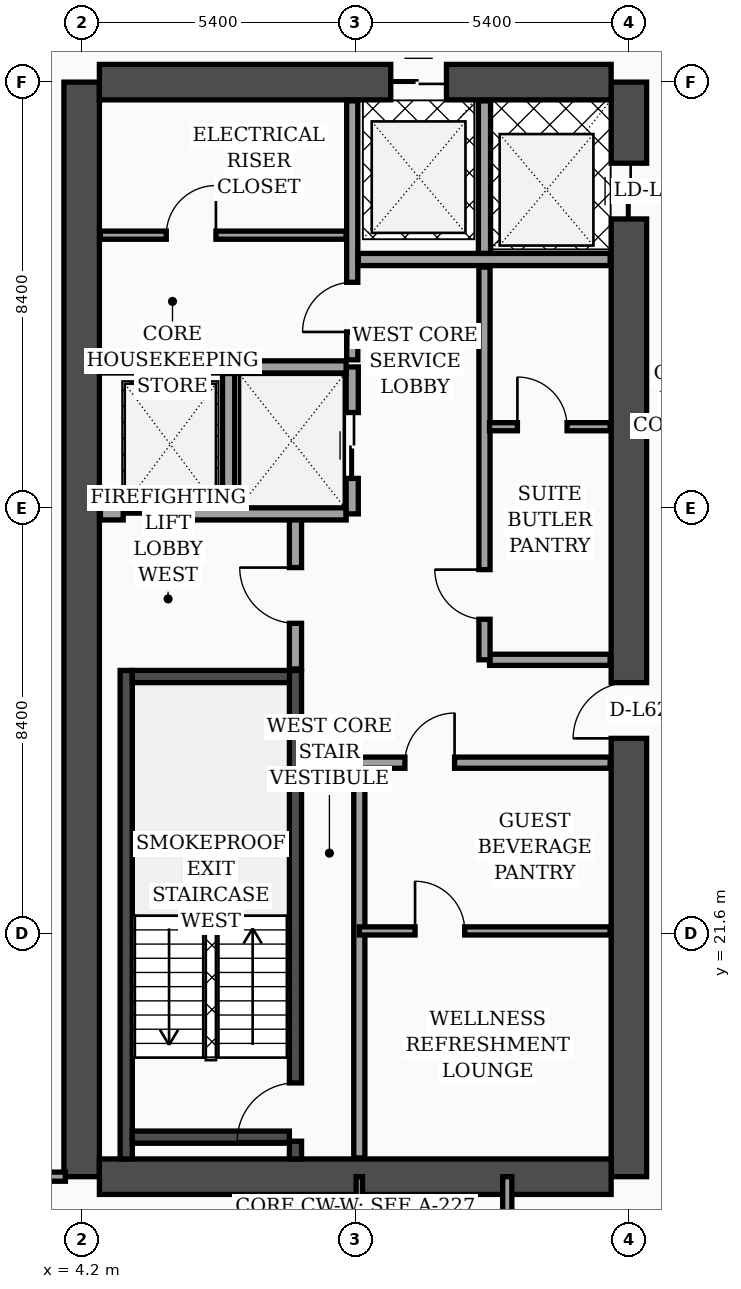
"""IFC4 building model, lengths in metres.
Left out: names, types, materials, properties, quantities, classifications, styles, units other than length and angle.
Written with IfcOpenShell. Run it as: python <this file> out.ifc"""

import sys

from ifc_helpers import new_model, si_unit, direction, frame, frame_2d, origin, place, context, subcontext, project, spatial, rectangle, extrude, element, fill, save


model = new_model("IFC4")
c1 = context("Model", 3, precision=1e-05, world=origin(), true_north=direction((0.0, 1.0)))
c2 = subcontext(c1, "Body", "Model", "MODEL_VIEW")
j1 = project(units=[si_unit("LENGTHUNIT", "METRE"), si_unit("PLANEANGLEUNIT", "RADIAN")], contexts=[c1])
p1 = place(None, origin())
s1 = spatial("IfcSite", under=j1, at=p1, CompositionType="ELEMENT")
p2 = place(p1, origin())
s2 = spatial("IfcBuilding", under=s1, at=p2, CompositionType="ELEMENT")
p3 = place(p2, frame((0.0, 0.0, 251.4)))
s3 = spatial("IfcBuildingStorey", under=s2, at=p3, CompositionType="ELEMENT", Elevation=251.4)
p4 = place(p3, frame((4.2, 16.8, 0.0), z_axis=(0.0, 0.0, 1.0), x_axis=(0.0, 1.0, 0.0)))
e1 = element("IfcWall", 1, at=p4, inside=s3, PredefinedType="SHEAR", context=c2, shape_type="SweptSolid", body=[
    extrude(rectangle(XDim=21.6, YDim=0.7, at=frame_2d((10.8, 0.0))), origin(), (0.0, 0.0, 1.0), 3.56),
])
p5 = place(p3, frame((15.0, 16.8, 0.0), z_axis=(0.0, 0.0, 1.0), x_axis=(0.0, 1.0, 0.0)))
e2 = element("IfcWall", 2, at=p5, inside=s3, PredefinedType="SHEAR", context=c2, shape_type="SweptSolid", body=[
    extrude(rectangle(XDim=21.6, YDim=0.7, at=frame_2d((10.8, 0.0))), origin(), (0.0, 0.0, 1.0), 3.56),
])
p6 = place(p5, frame((8.65, 0.0, 0.0)))
e3 = element("IfcOpeningElement", 3, at=p6, cuts=e2, PredefinedType="OPENING", context=c2, shape_type="SweptSolid", body=[
    extrude(rectangle(XDim=1.1, YDim=2.2, at=frame_2d((0.55, 1.1))), frame((0.0, 0.36, 0.0), z_axis=(0.0, -1.0, 0.0), x_axis=(1.0, 0.0, 0.0)), (0.0, 0.0, 1.0), 0.72),
])
p7 = place(p5, frame((18.9, 0.0, 0.0)))
e4 = element("IfcOpeningElement", 4, at=p7, cuts=e2, PredefinedType="OPENING", context=c2, shape_type="SweptSolid", body=[
    extrude(rectangle(XDim=1.1, YDim=2.2, at=frame_2d((0.55, 1.1))), frame((0.0, 0.36, 0.0), z_axis=(0.0, -1.0, 0.0), x_axis=(1.0, 0.0, 0.0)), (0.0, 0.0, 1.0), 0.72),
])
p8 = place(p3, frame((4.55, 38.4, 0.0), z_axis=(0.0, 0.0, 1.0), x_axis=(1.0, 0.0, 0.0)))
e5 = element("IfcWall", 5, at=p8, inside=s3, PredefinedType="SHEAR", context=c2, shape_type="SweptSolid", body=[
    extrude(rectangle(XDim=10.1, YDim=0.7, at=frame_2d((5.05, 0.0))), origin(), (0.0, 0.0, 1.0), 3.56),
])
p9 = place(p8, frame((5.75, 0.0, 0.0)))
e6 = element("IfcOpeningElement", 6, at=p9, cuts=e5, PredefinedType="OPENING", context=c2, shape_type="SweptSolid", body=[
    extrude(rectangle(XDim=1.1, YDim=2.2, at=frame_2d((0.55, 1.1))), frame((0.0, 0.36, 0.0), z_axis=(0.0, -1.0, 0.0), x_axis=(1.0, 0.0, 0.0)), (0.0, 0.0, 1.0), 0.72),
])
p10 = place(p3, frame((4.55, 16.8, 0.0), z_axis=(0.0, 0.0, 1.0), x_axis=(1.0, 0.0, 0.0)))
e7 = element("IfcWall", 7, at=p10, inside=s3, PredefinedType="SHEAR", context=c2, shape_type="SweptSolid", body=[
    extrude(rectangle(XDim=10.1, YDim=0.7, at=frame_2d((5.05, 0.0))), origin(), (0.0, 0.0, 1.0), 3.56),
])
p11 = place(p3, frame((5.08, 17.15, 0.0), z_axis=(0.0, 0.0, 1.0), x_axis=(0.0, 1.0, 0.0)))
e8 = element("IfcWall", 8, at=p11, inside=s3, PredefinedType="SOLIDWALL", context=c2, shape_type="SweptSolid", body=[
    extrude(rectangle(XDim=9.64, YDim=0.24, at=frame_2d((4.82, 0.0))), origin(), (0.0, 0.0, 1.0), 3.56),
])
p12 = place(p3, frame((8.42, 17.15, 0.0), z_axis=(0.0, 0.0, 1.0), x_axis=(0.0, 1.0, 0.0)))
e9 = element("IfcWall", 9, at=p12, inside=s3, PredefinedType="SOLIDWALL", context=c2, shape_type="SweptSolid", body=[
    extrude(rectangle(XDim=9.64, YDim=0.24, at=frame_2d((4.82, 0.0))), origin(), (0.0, 0.0, 1.0), 3.56),
])
p13 = place(p12, frame((0.35, 0.0, 0.0)))
e10 = element("IfcOpeningElement", 10, at=p13, cuts=e9, PredefinedType="OPENING", context=c2, shape_type="SweptSolid", body=[
    extrude(rectangle(XDim=1.15, YDim=2.2, at=frame_2d((0.575, 1.1))), frame((0.0, 0.13, 0.0), z_axis=(0.0, -1.0, 0.0), x_axis=(1.0, 0.0, 0.0)), (0.0, 0.0, 1.0), 0.26),
])
for number, where, z_axis, x_axis in (
    (11, (5.2, 17.58, 0.0), (0.0, 0.0, 1.0), (1.0, 0.0, 0.0)),
    (12, (5.2, 26.67, 0.0), (0.0, 0.0, 1.0), (1.0, 0.0, 0.0)),
):
    element("IfcWall", number, at=place(p3, frame(where, z_axis=z_axis, x_axis=x_axis)), inside=s3, PredefinedType="SOLIDWALL", context=c2, shape_type="SweptSolid", body=[
        extrude(rectangle(XDim=3.1, YDim=0.24, at=frame_2d((1.55, 0.0))), origin(), (0.0, 0.0, 1.0), 3.56),
    ])
p14 = place(p3, frame((8.42, 26.82, 0.0), z_axis=(0.0, 0.0, 1.0), x_axis=(0.0, 1.0, 0.0)))
e13 = element("IfcWall", 13, at=p14, inside=s3, PredefinedType="SOLIDWALL", context=c2, shape_type="SweptSolid", body=[
    extrude(rectangle(XDim=3.0, YDim=0.24, at=frame_2d((1.5, 0.0))), origin(), (0.0, 0.0, 1.0), 3.56),
])
p15 = place(p14, frame((0.9, 0.0, 0.0)))
e14 = element("IfcOpeningElement", 14, at=p15, cuts=e13, PredefinedType="OPENING", context=c2, shape_type="SweptSolid", body=[
    extrude(rectangle(XDim=1.1, YDim=2.2, at=frame_2d((0.55, 1.1))), frame((0.0, 0.13, 0.0), z_axis=(0.0, -1.0, 0.0), x_axis=(1.0, 0.0, 0.0)), (0.0, 0.0, 1.0), 0.26),
])
p16 = place(p3, frame((4.57, 29.88, 0.0), z_axis=(0.0, 0.0, 1.0), x_axis=(1.0, 0.0, 0.0)))
e15 = element("IfcWall", 15, at=p16, inside=s3, PredefinedType="SOLIDWALL", context=c2, shape_type="SweptSolid", body=[
    extrude(rectangle(XDim=4.85, YDim=0.24, at=frame_2d((2.425, 0.0))), origin(), (0.0, 0.0, 1.0), 3.56),
])
p17 = place(p16, frame((0.45, 0.0, 0.0)))
e16 = element("IfcOpeningElement", 16, at=p17, cuts=e15, PredefinedType="OPENING", context=c2, shape_type="SweptSolid", body=[
    extrude(rectangle(XDim=1.3, YDim=2.35, at=frame_2d((0.65, 1.175))), frame((0.0, 0.13, 0.0), z_axis=(0.0, -1.0, 0.0), x_axis=(1.0, 0.0, 0.0)), (0.0, 0.0, 1.0), 0.26),
])
p18 = place(p3, frame((7.1, 30.02, 0.0), z_axis=(0.0, 0.0, 1.0), x_axis=(0.0, 1.0, 0.0)))
e17 = element("IfcWall", 17, at=p18, inside=s3, PredefinedType="SOLIDWALL", context=c2, shape_type="SweptSolid", body=[
    extrude(rectangle(XDim=2.63, YDim=0.24, at=frame_2d((1.315, 0.0))), origin(), (0.0, 0.0, 1.0), 3.56),
])
p19 = place(p3, frame((9.54, 29.88, 0.0), z_axis=(0.0, 0.0, 1.0), x_axis=(0.0, 1.0, 0.0)))
e18 = element("IfcWall", 18, at=p19, inside=s3, PredefinedType="SOLIDWALL", context=c2, shape_type="SweptSolid", body=[
    extrude(rectangle(XDim=2.9, YDim=0.24, at=frame_2d((1.45, 0.0))), origin(), (0.0, 0.0, 1.0), 3.56),
])
p20 = place(p19, frame((0.7, 0.0, 0.0)))
e19 = element("IfcOpeningElement", 19, at=p20, cuts=e18, PredefinedType="OPENING", context=c2, shape_type="SweptSolid", body=[
    extrude(rectangle(XDim=1.3, YDim=2.35, at=frame_2d((0.65, 1.175))), frame((0.0, 0.13, 0.0), z_axis=(0.0, -1.0, 0.0), x_axis=(1.0, 0.0, 0.0)), (0.0, 0.0, 1.0), 0.26),
])
p21 = place(p3, frame((4.57, 32.78, 0.0), z_axis=(0.0, 0.0, 1.0), x_axis=(1.0, 0.0, 0.0)))
e20 = element("IfcWall", 20, at=p21, inside=s3, PredefinedType="SOLIDWALL", context=c2, shape_type="SweptSolid", body=[
    extrude(rectangle(XDim=4.85, YDim=0.24, at=frame_2d((2.425, 0.0))), origin(), (0.0, 0.0, 1.0), 3.19),
])
p22 = place(p3, frame((9.68, 17.17, 0.0), z_axis=(0.0, 0.0, 1.0), x_axis=(0.0, 1.0, 0.0)))
e21 = element("IfcWall", 21, at=p22, inside=s3, PredefinedType="SOLIDWALL", context=c2, shape_type="SweptSolid", body=[
    extrude(rectangle(XDim=7.83, YDim=0.22, at=frame_2d((3.915, 0.0))), origin(), (0.0, 0.0, 1.0), 3.56),
])
p23 = place(p3, frame((4.57, 35.38, 0.0), z_axis=(0.0, 0.0, 1.0), x_axis=(1.0, 0.0, 0.0)))
e22 = element("IfcWall", 22, at=p23, inside=s3, PredefinedType="PARTITIONING", context=c2, shape_type="SweptSolid", body=[
    extrude(rectangle(XDim=4.85, YDim=0.16, at=frame_2d((2.425, 0.0))), origin(), (0.0, 0.0, 1.0), 3.56),
])
p24 = place(p23, frame((1.3, 0.0, 0.0)))
e23 = element("IfcOpeningElement", 23, at=p24, cuts=e22, PredefinedType="OPENING", context=c2, shape_type="SweptSolid", body=[
    extrude(rectangle(XDim=0.98, YDim=2.15, at=frame_2d((0.49, 1.075))), frame((0.0, 0.09, 0.0), z_axis=(0.0, -1.0, 0.0), x_axis=(1.0, 0.0, 0.0)), (0.0, 0.0, 1.0), 0.18),
])
p25 = place(p3, frame((9.54, 32.92, 0.0), z_axis=(0.0, 0.0, 1.0), x_axis=(0.0, 1.0, 0.0)))
e24 = element("IfcWall", 24, at=p25, inside=s3, PredefinedType="SOLIDWALL", context=c2, shape_type="SweptSolid", body=[
    extrude(rectangle(XDim=5.11, YDim=0.22, at=frame_2d((2.555, 0.0))), origin(), (0.0, 0.0, 1.0), 3.56),
])
p26 = place(p25, frame((0.55, 0.0, 0.0)))
e25 = element("IfcOpeningElement", 25, at=p26, cuts=e24, PredefinedType="OPENING", context=c2, shape_type="SweptSolid", body=[
    extrude(rectangle(XDim=0.98, YDim=2.15, at=frame_2d((0.49, 1.075))), frame((0.0, 0.12, 0.0), z_axis=(0.0, -1.0, 0.0), x_axis=(1.0, 0.0, 0.0)), (0.0, 0.0, 1.0), 0.24),
])
p27 = place(p3, frame((9.68, 21.65, 0.0), z_axis=(0.0, 0.0, 1.0), x_axis=(1.0, 0.0, 0.0)))
e26 = element("IfcWall", 26, at=p27, inside=s3, PredefinedType="PARTITIONING", context=c2, shape_type="SweptSolid", body=[
    extrude(rectangle(XDim=4.95, YDim=0.16, at=frame_2d((2.475, 0.0))), origin(), (0.0, 0.0, 1.0), 3.09),
])
p28 = place(p27, frame((1.1, 0.0, 0.0)))
e27 = element("IfcOpeningElement", 27, at=p28, cuts=e26, PredefinedType="OPENING", context=c2, shape_type="SweptSolid", body=[
    extrude(rectangle(XDim=0.98, YDim=2.15, at=frame_2d((0.49, 1.075))), frame((0.0, 0.09, 0.0), z_axis=(0.0, -1.0, 0.0), x_axis=(1.0, 0.0, 0.0)), (0.0, 0.0, 1.0), 0.18),
])
p29 = place(p3, frame((9.68, 24.97, 0.0), z_axis=(0.0, 0.0, 1.0), x_axis=(1.0, 0.0, 0.0)))
e28 = element("IfcWall", 28, at=p29, inside=s3, PredefinedType="SOLIDWALL", context=c2, shape_type="SweptSolid", body=[
    extrude(rectangle(XDim=4.95, YDim=0.22, at=frame_2d((2.475, 0.0))), origin(), (0.0, 0.0, 1.0), 2.99),
])
p30 = place(p29, frame((0.9, 0.0, 0.0)))
e29 = element("IfcOpeningElement", 29, at=p30, cuts=e28, PredefinedType="OPENING", context=c2, shape_type="SweptSolid", body=[
    extrude(rectangle(XDim=0.98, YDim=2.15, at=frame_2d((0.49, 1.075))), frame((0.0, 0.12, 0.0), z_axis=(0.0, -1.0, 0.0), x_axis=(1.0, 0.0, 0.0)), (0.0, 0.0, 1.0), 0.24),
])
p31 = place(p3, frame((12.25, 27.0, 0.0), z_axis=(0.0, 0.0, 1.0), x_axis=(1.0, 0.0, 0.0)))
e30 = element("IfcWall", 30, at=p31, inside=s3, PredefinedType="SOLIDWALL", context=c2, shape_type="SweptSolid", body=[
    extrude(rectangle(XDim=2.38, YDim=0.22, at=frame_2d((1.19, 0.0))), origin(), (0.0, 0.0, 1.0), 3.56),
])
p32 = place(p3, frame((12.15, 27.0, 0.0), z_axis=(0.0, 0.0, 1.0), x_axis=(0.0, 1.0, 0.0)))
e31 = element("IfcWall", 31, at=p32, inside=s3, PredefinedType="SOLIDWALL", context=c2, shape_type="SweptSolid", body=[
    extrude(rectangle(XDim=7.75, YDim=0.22, at=frame_2d((3.875, 0.0))), origin(), (0.0, 0.0, 1.0), 3.56),
])
p33 = place(p32, frame((0.8, 0.0, 0.0)))
e32 = element("IfcOpeningElement", 32, at=p33, cuts=e31, PredefinedType="OPENING", context=c2, shape_type="SweptSolid", body=[
    extrude(rectangle(XDim=0.98, YDim=2.15, at=frame_2d((0.49, 1.075))), frame((0.0, 0.12, 0.0), z_axis=(0.0, -1.0, 0.0), x_axis=(1.0, 0.0, 0.0)), (0.0, 0.0, 1.0), 0.24),
])
p34 = place(p3, frame((12.25, 31.6, 0.0), z_axis=(0.0, 0.0, 1.0), x_axis=(1.0, 0.0, 0.0)))
e33 = element("IfcWall", 33, at=p34, inside=s3, PredefinedType="PARTITIONING", context=c2, shape_type="SweptSolid", body=[
    extrude(rectangle(XDim=2.38, YDim=0.16, at=frame_2d((1.19, 0.0))), origin(), (0.0, 0.0, 1.0), 3.14),
])
p35 = place(p34, frame((0.55, 0.0, 0.0)))
e34 = element("IfcOpeningElement", 34, at=p35, cuts=e33, PredefinedType="OPENING", context=c2, shape_type="SweptSolid", body=[
    extrude(rectangle(XDim=0.98, YDim=2.15, at=frame_2d((0.49, 1.075))), frame((0.0, 0.09, 0.0), z_axis=(0.0, -1.0, 0.0), x_axis=(1.0, 0.0, 0.0)), (0.0, 0.0, 1.0), 0.18),
])
p36 = place(p3, frame((9.66, 34.9, 0.0), z_axis=(0.0, 0.0, 1.0), x_axis=(1.0, 0.0, 0.0)))
e35 = element("IfcWall", 35, at=p36, inside=s3, PredefinedType="SOLIDWALL", context=c2, shape_type="SweptSolid", body=[
    extrude(rectangle(XDim=4.97, YDim=0.24, at=frame_2d((2.485, 0.0))), origin(), (0.0, 0.0, 1.0), 3.56),
])
p37 = place(p3, frame((12.15, 35.02, 0.0), z_axis=(0.0, 0.0, 1.0), x_axis=(0.0, 1.0, 0.0)))
e36 = element("IfcWall", 36, at=p37, inside=s3, PredefinedType="SOLIDWALL", context=c2, shape_type="SweptSolid", body=[
    extrude(rectangle(XDim=3.01, YDim=0.24, at=frame_2d((1.505, 0.0))), origin(), (0.0, 0.0, 1.0), 3.56),
])
p38 = place(p3, frame((0.08, 16.8, 0.0), z_axis=(0.0, 0.0, 1.0), x_axis=(1.0, 0.0, 0.0)))
e37 = element("IfcWall", 37, at=p38, inside=s3, PredefinedType="PARTITIONING", context=c2, shape_type="SweptSolid", body=[
    extrude(rectangle(XDim=3.8, YDim=0.18, at=frame_2d((1.9, 0.0))), origin(), (0.0, 0.0, 1.0), 2.99),
])
p39 = place(p3, frame((9.68, 14.75, 0.0), z_axis=(0.0, 0.0, 1.0), x_axis=(0.0, 1.0, 0.0)))
e38 = element("IfcWall", 38, at=p39, inside=s3, PredefinedType="PARTITIONING", context=c2, shape_type="SweptSolid", body=[
    extrude(rectangle(XDim=2.05, YDim=0.125, at=frame_2d((1.025, 0.0))), origin(), (0.0, 0.0, 1.0), 3.56),
])
p40 = place(p3, frame((12.6, 2.44, 0.0), z_axis=(0.0, 0.0, 1.0), x_axis=(0.0, 1.0, 0.0)))
e39 = element("IfcWall", 39, at=p40, inside=s3, PredefinedType="PARTITIONING", context=c2, shape_type="SweptSolid", body=[
    extrude(rectangle(XDim=14.36, YDim=0.18, at=frame_2d((7.18, 0.0))), origin(), (0.0, 0.0, 1.0), 2.99),
])
p41 = place(p40, frame((3.01, 0.0, 0.0)))
e40 = element("IfcOpeningElement", 40, at=p41, cuts=e39, PredefinedType="OPENING", context=c2, shape_type="SweptSolid", body=[
    extrude(rectangle(XDim=1.02, YDim=2.2, at=frame_2d((0.51, 1.1))), frame((0.0, 0.1, 0.0), z_axis=(0.0, -1.0, 0.0), x_axis=(1.0, 0.0, 0.0)), (0.0, 0.0, 1.0), 0.2),
])
p42 = place(p40, frame((9.52, 0.0, 0.0)))
e41 = element("IfcOpeningElement", 41, at=p42, cuts=e39, PredefinedType="OPENING", context=c2, shape_type="SweptSolid", body=[
    extrude(rectangle(XDim=1.02, YDim=2.2, at=frame_2d((0.51, 1.1))), frame((0.0, 0.1, 0.0), z_axis=(0.0, -1.0, 0.0), x_axis=(1.0, 0.0, 0.0)), (0.0, 0.0, 1.0), 0.2),
])
p43 = place(p15, origin())
e42 = element("IfcDoor", 42, at=p43, inside=s3, OperationType="SINGLE_SWING_RIGHT", PredefinedType="DOOR", context=c2, shape_type="SweptSolid", body=[
    extrude(rectangle(XDim=1.1, YDim=2.2, at=frame_2d((0.55, 1.1))), frame((0.0, 0.025, 0.0), z_axis=(0.0, -1.0, 0.0), x_axis=(1.0, 0.0, 0.0)), (0.0, 0.0, 1.0), 0.05),
])
fill(e14, e42)
p44 = place(p17, origin())
e43 = element("IfcDoor", 43, at=p44, inside=s3, OperationType="DOUBLE_DOOR_SLIDING", PredefinedType="DOOR", context=c2, shape_type="SweptSolid", body=[
    extrude(rectangle(XDim=1.3, YDim=2.35, at=frame_2d((0.65, 1.175))), frame((0.0, 0.025, 0.0), z_axis=(0.0, -1.0, 0.0), x_axis=(1.0, 0.0, 0.0)), (0.0, 0.0, 1.0), 0.05),
])
fill(e16, e43)
p45 = place(p20, origin())
e44 = element("IfcDoor", 44, at=p45, inside=s3, OperationType="DOUBLE_DOOR_SLIDING", PredefinedType="DOOR", context=c2, shape_type="SweptSolid", body=[
    extrude(rectangle(XDim=1.3, YDim=2.35, at=frame_2d((0.65, 1.175))), frame((0.0, 0.025, 0.0), z_axis=(0.0, -1.0, 0.0), x_axis=(1.0, 0.0, 0.0)), (0.0, 0.0, 1.0), 0.05),
])
fill(e19, e44)
p46 = place(p24, origin())
e45 = element("IfcDoor", 45, at=p46, inside=s3, OperationType="SINGLE_SWING_RIGHT", PredefinedType="DOOR", context=c2, shape_type="SweptSolid", body=[
    extrude(rectangle(XDim=0.98, YDim=2.15, at=frame_2d((0.49, 1.075))), frame((0.0, 0.025, 0.0), z_axis=(0.0, -1.0, 0.0), x_axis=(1.0, 0.0, 0.0)), (0.0, 0.0, 1.0), 0.05),
])
fill(e23, e45)
p47 = place(p26, origin())
e46 = element("IfcDoor", 46, at=p47, inside=s3, OperationType="SINGLE_SWING_LEFT", PredefinedType="DOOR", context=c2, shape_type="SweptSolid", body=[
    extrude(rectangle(XDim=0.98, YDim=2.15, at=frame_2d((0.49, 1.075))), frame((0.0, 0.025, 0.0), z_axis=(0.0, -1.0, 0.0), x_axis=(1.0, 0.0, 0.0)), (0.0, 0.0, 1.0), 0.05),
])
fill(e25, e46)
p48 = place(p28, origin())
e47 = element("IfcDoor", 47, at=p48, inside=s3, OperationType="SINGLE_SWING_LEFT", PredefinedType="DOOR", context=c2, shape_type="SweptSolid", body=[
    extrude(rectangle(XDim=0.98, YDim=2.15, at=frame_2d((0.49, 1.075))), frame((0.0, 0.025, 0.0), z_axis=(0.0, -1.0, 0.0), x_axis=(1.0, 0.0, 0.0)), (0.0, 0.0, 1.0), 0.05),
])
fill(e27, e47)
p49 = place(p30, origin())
e48 = element("IfcDoor", 48, at=p49, inside=s3, OperationType="SINGLE_SWING_RIGHT", PredefinedType="DOOR", context=c2, shape_type="SweptSolid", body=[
    extrude(rectangle(XDim=0.98, YDim=2.15, at=frame_2d((0.49, 1.075))), frame((0.0, 0.025, 0.0), z_axis=(0.0, -1.0, 0.0), x_axis=(1.0, 0.0, 0.0)), (0.0, 0.0, 1.0), 0.05),
])
fill(e29, e48)
p50 = place(p33, origin())
e49 = element("IfcDoor", 49, at=p50, inside=s3, OperationType="SINGLE_SWING_RIGHT", PredefinedType="DOOR", context=c2, shape_type="SweptSolid", body=[
    extrude(rectangle(XDim=0.98, YDim=2.15, at=frame_2d((0.49, 1.075))), frame((0.0, 0.025, 0.0), z_axis=(0.0, -1.0, 0.0), x_axis=(1.0, 0.0, 0.0)), (0.0, 0.0, 1.0), 0.05),
])
fill(e32, e49)
p51 = place(p35, origin())
e50 = element("IfcDoor", 50, at=p51, inside=s3, OperationType="SINGLE_SWING_LEFT", PredefinedType="DOOR", context=c2, shape_type="SweptSolid", body=[
    extrude(rectangle(XDim=0.98, YDim=2.15, at=frame_2d((0.49, 1.075))), frame((0.0, 0.025, 0.0), z_axis=(0.0, -1.0, 0.0), x_axis=(1.0, 0.0, 0.0)), (0.0, 0.0, 1.0), 0.05),
])
fill(e34, e50)
p52 = place(p13, origin())
e51 = element("IfcDoor", 51, at=p52, inside=s3, OperationType="SINGLE_SWING_LEFT", PredefinedType="DOOR", context=c2, shape_type="SweptSolid", body=[
    extrude(rectangle(XDim=1.15, YDim=2.2, at=frame_2d((0.575, 1.1))), frame((0.0, 0.025, 0.0), z_axis=(0.0, -1.0, 0.0), x_axis=(1.0, 0.0, 0.0)), (0.0, 0.0, 1.0), 0.05),
])
fill(e10, e51)
p53 = place(p6, origin())
e52 = element("IfcDoor", 52, at=p53, inside=s3, OperationType="SINGLE_SWING_LEFT", PredefinedType="DOOR", context=c2, shape_type="SweptSolid", body=[
    extrude(rectangle(XDim=1.1, YDim=2.2, at=frame_2d((0.55, 1.1))), frame((0.0, 0.025, 0.0), z_axis=(0.0, -1.0, 0.0), x_axis=(1.0, 0.0, 0.0)), (0.0, 0.0, 1.0), 0.05),
])
fill(e3, e52)
p54 = place(p7, origin())
e53 = element("IfcDoor", 53, at=p54, inside=s3, OperationType="DOUBLE_DOOR_SLIDING", PredefinedType="DOOR", context=c2, shape_type="SweptSolid", body=[
    extrude(rectangle(XDim=1.1, YDim=2.2, at=frame_2d((0.55, 1.1))), frame((0.0, 0.025, 0.0), z_axis=(0.0, -1.0, 0.0), x_axis=(1.0, 0.0, 0.0)), (0.0, 0.0, 1.0), 0.05),
])
fill(e4, e53)
p55 = place(p9, origin())
e54 = element("IfcDoor", 54, at=p55, inside=s3, OperationType="DOUBLE_DOOR_SLIDING", PredefinedType="DOOR", context=c2, shape_type="SweptSolid", body=[
    extrude(rectangle(XDim=1.1, YDim=2.2, at=frame_2d((0.55, 1.1))), frame((0.0, 0.025, 0.0), z_axis=(0.0, -1.0, 0.0), x_axis=(1.0, 0.0, 0.0)), (0.0, 0.0, 1.0), 0.05),
])
fill(e6, e54)
save(model, sys.argv[1])
